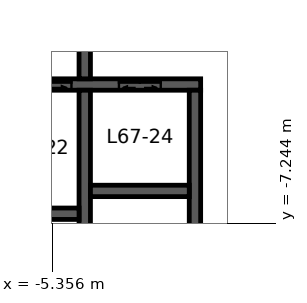
"""IFC4 building model, lengths in metres.
Left out: names, types, materials, properties, quantities, classifications, styles, units other than length and angle.
Written with IfcOpenShell. Run it as: python <this file> out.ifc"""

import sys

from ifc_helpers import new_model, si_unit, direction, frame, frame_2d, origin, place, context, subcontext, project, spatial, polyline, rectangle, outline, extrude, element, fill, save


model = new_model("IFC4")
c1 = context("Model", 3, precision=1e-05, world=origin(), true_north=direction((0.0, 1.0)))
c2 = subcontext(c1, "Body", "Model", "MODEL_VIEW")
j1 = project(units=[si_unit("LENGTHUNIT", "METRE"), si_unit("PLANEANGLEUNIT", "RADIAN")], contexts=[c1])
p1 = place(None, origin())
s1 = spatial("IfcSite", under=j1, at=p1, CompositionType="ELEMENT")
p2 = place(p1, origin())
s2 = spatial("IfcBuilding", under=s1, at=p2, CompositionType="ELEMENT")
p3 = place(p2, frame((0.0, 0.0, 267.4)))
s3 = spatial("IfcBuildingStorey", under=s2, at=p3, CompositionType="ELEMENT", Elevation=267.4)
p4 = place(p3, frame((-9.382, -3.6, 0.0), z_axis=(0.0, 0.0, 1.0), x_axis=(1.0, 0.0, 0.0)))
e1 = element("IfcWall", 1, at=p4, inside=s3, PredefinedType="SHEAR", context=c2, shape_type="SweptSolid", body=[
    extrude(outline(polyline([(0.087, -0.15), (3.232, -0.15), (4.532, -0.15), (5.782, -0.15), (6.882, -0.15), (7.932, -0.15), (7.932, 0.15), (6.882, 0.15), (5.782, 0.15), (4.532, 0.15), (3.232, 0.15), (-0.087, 0.15), (0.087, -0.15)])), origin(), (0.0, 0.0, 1.0), 3.9),
])
p5 = place(p4, frame((5.782, 0.0, 0.0)))
e2 = element("IfcOpeningElement", 2, at=p5, cuts=e1, PredefinedType="OPENING", context=c2, shape_type="SweptSolid", body=[
    extrude(rectangle(XDim=1.1, YDim=2.1, at=frame_2d((0.55, 1.05))), frame((0.0, 0.16, 0.0), z_axis=(0.0, -1.0, 0.0), x_axis=(1.0, 0.0, 0.0)), (0.0, 0.0, 1.0), 0.32),
])
p6 = place(p4, frame((3.232, 0.0, 0.0)))
e3 = element("IfcOpeningElement", 3, at=p6, cuts=e1, PredefinedType="OPENING", context=c2, shape_type="SweptSolid", body=[
    extrude(rectangle(XDim=1.3, YDim=2.1, at=frame_2d((0.65, 1.05))), frame((0.0, 0.16, 0.0), z_axis=(0.0, -1.0, 0.0), x_axis=(1.0, 0.0, 0.0)), (0.0, 0.0, 1.0), 0.32),
])
p7 = place(p3, frame((-1.6, -3.75, 0.0), z_axis=(0.0, 0.0, 1.0), x_axis=(0.0, -1.0, 0.0)))
e4 = element("IfcWall", 4, at=p7, inside=s3, PredefinedType="SHEAR", context=c2, shape_type="SweptSolid", body=[
    extrude(rectangle(XDim=6.175, YDim=0.3, at=frame_2d((3.087, 0.0))), origin(), (0.0, 0.0, 1.0), 3.9),
])
p8 = place(p7, frame((3.8, 0.0, 0.0)))
e5 = element("IfcOpeningElement", 5, at=p8, cuts=e4, PredefinedType="OPENING", context=c2, shape_type="SweptSolid", body=[
    extrude(rectangle(XDim=0.9, YDim=2.1, at=frame_2d((0.45, 1.05))), frame((0.0, 0.16, 0.0), z_axis=(0.0, -1.0, 0.0), x_axis=(1.0, 0.0, 0.0)), (0.0, 0.0, 1.0), 0.32),
])
p9 = place(p3, frame((-4.5, -3.45, 0.0), z_axis=(0.0, 0.0, 1.0), x_axis=(0.0, 1.0, 0.0)))
e6 = element("IfcWall", 6, at=p9, inside=s3, PredefinedType="SHEAR", context=c2, shape_type="SweptSolid", body=[
    extrude(rectangle(XDim=6.9, YDim=0.3, at=frame_2d((3.45, 0.0))), origin(), (0.0, 0.0, 1.0), 3.9),
])
p10 = place(p9, frame((2.95, 0.0, 0.0)))
e7 = element("IfcOpeningElement", 7, at=p10, cuts=e6, PredefinedType="OPENING", context=c2, shape_type="SweptSolid", body=[
    extrude(rectangle(XDim=1.0, YDim=2.1, at=frame_2d((0.5, 1.05))), frame((0.0, 0.16, 0.0), z_axis=(0.0, -1.0, 0.0), x_axis=(1.0, 0.0, 0.0)), (0.0, 0.0, 1.0), 0.32),
])
p11 = place(p3, frame((-4.5, -3.75, 0.0), z_axis=(0.0, 0.0, 1.0), x_axis=(0.0, -1.0, 0.0)))
e8 = element("IfcWall", 8, at=p11, inside=s3, PredefinedType="SHEAR", context=c2, shape_type="SweptSolid", body=[
    extrude(rectangle(XDim=6.175, YDim=0.3, at=frame_2d((3.087, 0.0))), origin(), (0.0, 0.0, 1.0), 3.9),
])
for number, where, z_axis, x_axis in (
    (9, (-4.35, -6.4, 0.0), (0.0, 0.0, 1.0), (1.0, 0.0, 0.0)),
    (10, (-7.25, -7.0, 0.0), (0.0, 0.0, 1.0), (1.0, 0.0, 0.0)),
):
    element("IfcWall", number, at=place(p3, frame(where, z_axis=z_axis, x_axis=x_axis)), inside=s3, PredefinedType="SHEAR", context=c2, shape_type="SweptSolid", body=[
        extrude(rectangle(XDim=2.6, YDim=0.3, at=frame_2d((1.3, 0.0))), origin(), (0.0, 0.0, 1.0), 3.9),
    ])
p12 = place(p5, origin())
e11 = element("IfcDoor", 11, at=p12, inside=s3, OperationType="DOUBLE_DOOR_SLIDING", PredefinedType="DOOR", context=c2, shape_type="SweptSolid", body=[
    extrude(rectangle(XDim=1.1, YDim=2.1, at=frame_2d((0.55, 1.05))), frame((0.0, 0.025, 0.0), z_axis=(0.0, -1.0, 0.0), x_axis=(1.0, 0.0, 0.0)), (0.0, 0.0, 1.0), 0.05),
])
fill(e2, e11)
p13 = place(p6, origin())
e12 = element("IfcDoor", 12, at=p13, inside=s3, OperationType="DOUBLE_DOOR_SLIDING", PredefinedType="DOOR", context=c2, shape_type="SweptSolid", body=[
    extrude(rectangle(XDim=1.3, YDim=2.1, at=frame_2d((0.65, 1.05))), frame((0.0, 0.025, 0.0), z_axis=(0.0, -1.0, 0.0), x_axis=(1.0, 0.0, 0.0)), (0.0, 0.0, 1.0), 0.05),
])
fill(e3, e12)
save(model, sys.argv[1])
